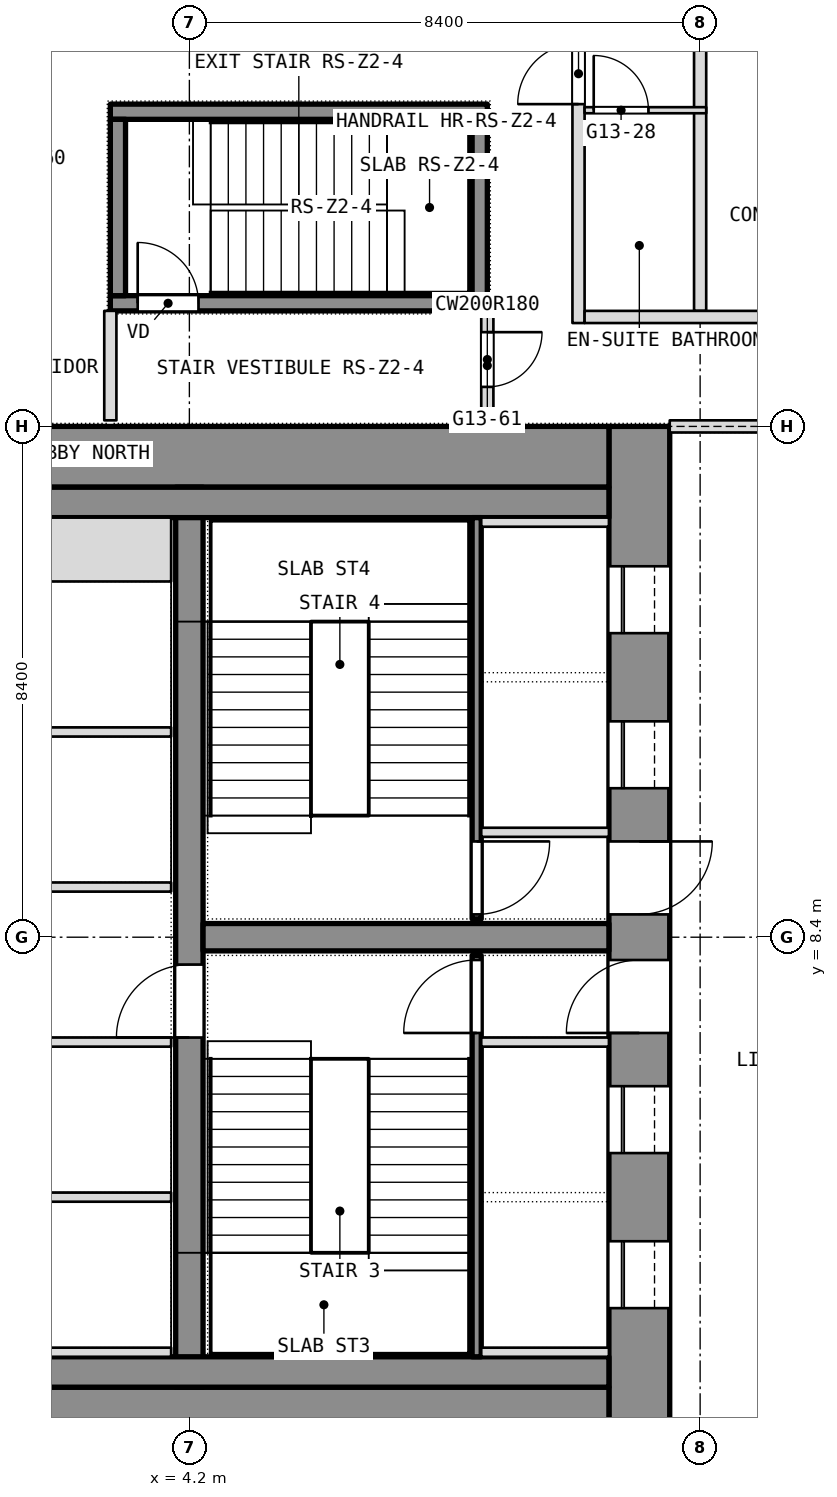
"""IFC4 building model, lengths in metres.
Left out: names, types, materials, properties, quantities, classifications, styles, units other than length and angle.
Written with IfcOpenShell. Run it as: python <this file> out.ifc"""

import sys

from ifc_helpers import new_model, si_unit, direction, frame, frame_2d, origin, place, context, subcontext, project, spatial, rectangle, extrude, element, fill, save


model = new_model("IFC4")
c1 = context("Model", 3, precision=1e-05, world=origin(), true_north=direction((0.0, 1.0)))
c2 = subcontext(c1, "Body", "Model", "MODEL_VIEW")
j1 = project(units=[si_unit("LENGTHUNIT", "METRE"), si_unit("PLANEANGLEUNIT", "RADIAN")], contexts=[c1])
p1 = place(None, origin())
s1 = spatial("IfcSite", under=j1, at=p1, CompositionType="ELEMENT")
p2 = place(p1, origin())
s2 = spatial("IfcBuilding", under=s1, at=p2, CompositionType="ELEMENT")
p3 = place(p2, frame((0.0, 0.0, 148.1)))
s3 = spatial("IfcBuildingStorey", under=s2, at=p3, CompositionType="ELEMENT", Elevation=148.1)
p4 = place(p3, frame((11.6, 0.0, 0.0), z_axis=(0.0, 0.0, 1.0), x_axis=(0.0, 1.0, 0.0)))
e1 = element("IfcWall", 1, at=p4, inside=s3, PredefinedType="SHEAR", context=c2, shape_type="SweptSolid", body=[
    extrude(rectangle(XDim=16.8, YDim=1.0, at=frame_2d((8.4, 0.0))), origin(), (0.0, 0.0, 1.0), 3.6),
])
p5 = place(p4, frame((2.3, 0.0, 0.0)))
e2 = element("IfcOpeningElement", 2, at=p5, cuts=e1, PredefinedType="OPENING", context=c2, shape_type="SweptSolid", body=[
    extrude(rectangle(XDim=1.1, YDim=2.1, at=frame_2d((0.55, 1.05))), frame((0.0, 0.5, 0.0), z_axis=(0.0, -1.0, 0.0), x_axis=(1.0, 0.0, 0.0)), (0.0, 0.0, 1.0), 1.0),
])
p6 = place(p4, frame((4.85, 0.0, 0.0)))
e3 = element("IfcOpeningElement", 3, at=p6, cuts=e1, PredefinedType="OPENING", context=c2, shape_type="SweptSolid", body=[
    extrude(rectangle(XDim=1.1, YDim=2.1, at=frame_2d((0.55, 1.05))), frame((0.0, 0.5, 0.0), z_axis=(0.0, -1.0, 0.0), x_axis=(1.0, 0.0, 0.0)), (0.0, 0.0, 1.0), 1.0),
])
p7 = place(p4, frame((6.825, 0.0, 0.0)))
e4 = element("IfcOpeningElement", 4, at=p7, cuts=e1, PredefinedType="OPENING", context=c2, shape_type="SweptSolid", body=[
    extrude(rectangle(XDim=1.2, YDim=2.1, at=frame_2d((0.6, 1.05))), frame((0.0, 0.5, 0.0), z_axis=(0.0, -1.0, 0.0), x_axis=(1.0, 0.0, 0.0)), (0.0, 0.0, 1.0), 1.0),
])
p8 = place(p4, frame((13.4, 0.0, 0.0)))
e5 = element("IfcOpeningElement", 5, at=p8, cuts=e1, PredefinedType="OPENING", context=c2, shape_type="SweptSolid", body=[
    extrude(rectangle(XDim=1.1, YDim=2.1, at=frame_2d((0.55, 1.05))), frame((0.0, 0.5, 0.0), z_axis=(0.0, -1.0, 0.0), x_axis=(1.0, 0.0, 0.0)), (0.0, 0.0, 1.0), 1.0),
])
p9 = place(p4, frame((10.85, 0.0, 0.0)))
e6 = element("IfcOpeningElement", 6, at=p9, cuts=e1, PredefinedType="OPENING", context=c2, shape_type="SweptSolid", body=[
    extrude(rectangle(XDim=1.1, YDim=2.1, at=frame_2d((0.55, 1.05))), frame((0.0, 0.5, 0.0), z_axis=(0.0, -1.0, 0.0), x_axis=(1.0, 0.0, 0.0)), (0.0, 0.0, 1.0), 1.0),
])
p10 = place(p4, frame((8.775, 0.0, 0.0)))
e7 = element("IfcOpeningElement", 7, at=p10, cuts=e1, PredefinedType="OPENING", context=c2, shape_type="SweptSolid", body=[
    extrude(rectangle(XDim=1.2, YDim=2.1, at=frame_2d((0.6, 1.05))), frame((0.0, 0.5, 0.0), z_axis=(0.0, -1.0, 0.0), x_axis=(1.0, 0.0, 0.0)), (0.0, 0.0, 1.0), 1.0),
])
for number, where, z_axis, x_axis in (
    (8, (-11.1, 0.5, 0.0), (0.0, 0.0, 1.0), (1.0, 0.0, 0.0)),
    (9, (-11.1, 16.3, 0.0), (0.0, 0.0, 1.0), (1.0, 0.0, 0.0)),
):
    element("IfcWall", number, at=place(p3, frame(where, z_axis=z_axis, x_axis=x_axis)), inside=s3, PredefinedType="SHEAR", context=c2, shape_type="SweptSolid", body=[
        extrude(rectangle(XDim=22.2, YDim=1.0, at=frame_2d((11.1, 0.0))), origin(), (0.0, 0.0, 1.0), 3.6),
    ])
p11 = place(p3, frame((4.2, 1.0, 0.0), z_axis=(0.0, 0.0, 1.0), x_axis=(0.0, 1.0, 0.0)))
e10 = element("IfcWall", 10, at=p11, inside=s3, PredefinedType="SHEAR", context=c2, shape_type="SweptSolid", body=[
    extrude(rectangle(XDim=14.8, YDim=0.45, at=frame_2d((7.4, 0.0))), origin(), (0.0, 0.0, 1.0), 3.6),
])
p12 = place(p11, frame((5.75, 0.0, 0.0)))
e11 = element("IfcOpeningElement", 11, at=p12, cuts=e10, PredefinedType="OPENING", context=c2, shape_type="SweptSolid", body=[
    extrude(rectangle(XDim=1.2, YDim=2.1, at=frame_2d((0.6, 1.05))), frame((0.0, 0.225, 0.0), z_axis=(0.0, -1.0, 0.0), x_axis=(1.0, 0.0, 0.0)), (0.0, 0.0, 1.0), 0.45),
])
p13 = place(p3, frame((4.425, 8.4, 0.0), z_axis=(0.0, 0.0, 1.0), x_axis=(1.0, 0.0, 0.0)))
e12 = element("IfcWall", 12, at=p13, inside=s3, PredefinedType="SHEAR", context=c2, shape_type="SweptSolid", body=[
    extrude(rectangle(XDim=6.675, YDim=0.45, at=frame_2d((3.337, 0.0))), origin(), (0.0, 0.0, 1.0), 3.6),
])
p14 = place(p3, frame((12.6, 18.7, 0.0), z_axis=(0.0, 0.0, 1.0), x_axis=(0.0, 1.0, 0.0)))
e13 = element("IfcWall", 13, at=p14, inside=s3, PredefinedType="PARTITIONING", context=c2, shape_type="SweptSolid", body=[
    extrude(rectangle(XDim=9.24, YDim=0.2, at=frame_2d((4.62, 0.0))), origin(), (0.0, 0.0, 1.0), 3.34),
])
p15 = place(p3, frame((10.6, 18.5, 0.0), z_axis=(0.0, 0.0, 1.0), x_axis=(0.0, 1.0, 0.0)))
e14 = element("IfcWall", 14, at=p15, inside=s3, PredefinedType="PARTITIONING", context=c2, shape_type="SweptSolid", body=[
    extrude(rectangle(XDim=5.0, YDim=0.2, at=frame_2d((2.5, 0.0))), origin(), (0.0, 0.0, 1.0), 3.34),
])
p16 = place(p15, frame((3.6, 0.0, 0.0)))
e15 = element("IfcOpeningElement", 15, at=p16, cuts=e14, PredefinedType="OPENING", context=c2, shape_type="SweptSolid", body=[
    extrude(rectangle(XDim=1.0, YDim=2.1, at=frame_2d((0.5, 1.05))), frame((0.0, 0.1, 0.0), z_axis=(0.0, -1.0, 0.0), x_axis=(1.0, 0.0, 0.0)), (0.0, 0.0, 1.0), 0.2),
])
p17 = place(p3, frame((9.1, 16.9, 0.0), z_axis=(0.0, 0.0, 1.0), x_axis=(0.0, 1.0, 0.0)))
e16 = element("IfcWall", 16, at=p17, inside=s3, PredefinedType="PARTITIONING", context=c2, shape_type="SweptSolid", body=[
    extrude(rectangle(XDim=1.8, YDim=0.2, at=frame_2d((0.9, 0.0))), origin(), (0.0, 0.0, 1.0), 3.34),
])
p18 = place(p17, frame((0.55, 0.0, 0.0)))
e17 = element("IfcOpeningElement", 17, at=p18, cuts=e16, PredefinedType="OPENING", context=c2, shape_type="SweptSolid", body=[
    extrude(rectangle(XDim=0.9, YDim=2.1, at=frame_2d((0.45, 1.05))), frame((0.0, 0.1, 0.0), z_axis=(0.0, -1.0, 0.0), x_axis=(1.0, 0.0, 0.0)), (0.0, 0.0, 1.0), 0.2),
])
p19 = place(p3, frame((2.9, 16.9, 0.0), z_axis=(0.0, 0.0, 1.0), x_axis=(0.0, 1.0, 0.0)))
e18 = element("IfcWall", 18, at=p19, inside=s3, PredefinedType="PARTITIONING", context=c2, shape_type="SweptSolid", body=[
    extrude(rectangle(XDim=1.8, YDim=0.2, at=frame_2d((0.9, 0.0))), origin(), (0.0, 0.0, 1.0), 3.34),
])
p20 = place(p3, frame((10.7, 18.6, 0.0), z_axis=(0.0, 0.0, 1.0), x_axis=(1.0, 0.0, 0.0)))
e19 = element("IfcWall", 19, at=p20, inside=s3, PredefinedType="PARTITIONING", context=c2, shape_type="SweptSolid", body=[
    extrude(rectangle(XDim=6.2, YDim=0.2, at=frame_2d((3.1, 0.0))), origin(), (0.0, 0.0, 1.0), 3.34),
])
p21 = place(p3, frame((10.7, 22.0, 0.0), z_axis=(0.0, 0.0, 1.0), x_axis=(1.0, 0.0, 0.0)))
e20 = element("IfcWall", 20, at=p21, inside=s3, PredefinedType="PARTITIONING", context=c2, shape_type="SweptSolid", body=[
    extrude(rectangle(XDim=2.0, YDim=0.1, at=frame_2d((1.0, 0.0))), origin(), (0.0, 0.0, 1.0), 3.34),
])
p22 = place(p21, frame((0.15, 0.0, 0.0)))
e21 = element("IfcOpeningElement", 21, at=p22, cuts=e20, PredefinedType="OPENING", context=c2, shape_type="SweptSolid", body=[
    extrude(rectangle(XDim=0.9, YDim=2.1, at=frame_2d((0.45, 1.05))), frame((0.0, 0.05, 0.0), z_axis=(0.0, -1.0, 0.0), x_axis=(1.0, 0.0, 0.0)), (0.0, 0.0, 1.0), 0.1),
])
for number, where, z_axis, x_axis in (
    (22, (-11.1, 1.25, 0.0), (0.0, 0.0, 1.0), (1.0, 0.0, 0.0)),
    (23, (-11.1, 15.55, 0.0), (0.0, 0.0, 1.0), (1.0, 0.0, 0.0)),
):
    element("IfcWall", number, at=place(p3, frame(where, z_axis=z_axis, x_axis=x_axis)), inside=s3, PredefinedType="PARTITIONING", context=c2, shape_type="SweptSolid", body=[
        extrude(rectangle(XDim=22.2, YDim=0.5, at=frame_2d((11.1, 0.0))), origin(), (0.0, 0.0, 1.0), 3.34),
    ])
p23 = place(p3, frame((8.925, 1.5, 0.0), z_axis=(0.0, 0.0, 1.0), x_axis=(0.0, 1.0, 0.0)))
e24 = element("IfcWall", 24, at=p23, inside=s3, PredefinedType="SHEAR", context=c2, shape_type="SweptSolid", body=[
    extrude(rectangle(XDim=6.6, YDim=0.15, at=frame_2d((3.3, 0.0))), origin(), (0.0, 0.0, 1.0), 3.34),
])
p24 = place(p23, frame((5.325, 0.0, 0.0)))
e25 = element("IfcOpeningElement", 25, at=p24, cuts=e24, PredefinedType="OPENING", context=c2, shape_type="SweptSolid", body=[
    extrude(rectangle(XDim=1.2, YDim=2.1, at=frame_2d((0.6, 1.05))), frame((0.0, 0.075, 0.0), z_axis=(0.0, -1.0, 0.0), x_axis=(1.0, 0.0, 0.0)), (0.0, 0.0, 1.0), 0.15),
])
for number, where, z_axis, x_axis in (
    (26, (9.0, 6.675, 0.0), (0.0, 0.0, 1.0), (1.0, 0.0, 0.0)),
    (27, (9.0, 1.575, 0.0), (0.0, 0.0, 1.0), (1.0, 0.0, 0.0)),
):
    element("IfcWall", number, at=place(p3, frame(where, z_axis=z_axis, x_axis=x_axis)), inside=s3, PredefinedType="SHEAR", context=c2, shape_type="SweptSolid", body=[
        extrude(rectangle(XDim=2.1, YDim=0.15, at=frame_2d((1.05, 0.0))), origin(), (0.0, 0.0, 1.0), 3.6),
    ])
p25 = place(p3, frame((8.925, 8.7, 0.0), z_axis=(0.0, 0.0, 1.0), x_axis=(0.0, 1.0, 0.0)))
e28 = element("IfcWall", 28, at=p25, inside=s3, PredefinedType="SHEAR", context=c2, shape_type="SweptSolid", body=[
    extrude(rectangle(XDim=6.6, YDim=0.15, at=frame_2d((3.3, 0.0))), origin(), (0.0, 0.0, 1.0), 3.34),
])
p26 = place(p25, frame((0.075, 0.0, 0.0)))
e29 = element("IfcOpeningElement", 29, at=p26, cuts=e28, PredefinedType="OPENING", context=c2, shape_type="SweptSolid", body=[
    extrude(rectangle(XDim=1.2, YDim=2.1, at=frame_2d((0.6, 1.05))), frame((0.0, 0.075, 0.0), z_axis=(0.0, -1.0, 0.0), x_axis=(1.0, 0.0, 0.0)), (0.0, 0.0, 1.0), 0.15),
])
for number, where, z_axis, x_axis in (
    (30, (9.0, 10.125, 0.0), (0.0, 0.0, 1.0), (1.0, 0.0, 0.0)),
    (31, (9.0, 15.225, 0.0), (0.0, 0.0, 1.0), (1.0, 0.0, 0.0)),
):
    element("IfcWall", number, at=place(p3, frame(where, z_axis=z_axis, x_axis=x_axis)), inside=s3, PredefinedType="SHEAR", context=c2, shape_type="SweptSolid", body=[
        extrude(rectangle(XDim=2.1, YDim=0.15, at=frame_2d((1.05, 0.0))), origin(), (0.0, 0.0, 1.0), 3.6),
    ])
p27 = place(p3, frame((-3.9, 4.125, 0.0), z_axis=(0.0, 0.0, 1.0), x_axis=(1.0, 0.0, 0.0)))
e32 = element("IfcWall", 32, at=p27, inside=s3, PredefinedType="PARTITIONING", context=c2, shape_type="SweptSolid", body=[
    extrude(rectangle(XDim=7.8, YDim=0.15, at=frame_2d((3.9, 0.0))), origin(), (0.0, 0.0, 1.0), 3.34),
])
p28 = place(p27, frame((3.75, 0.0, 0.0)))
e33 = element("IfcOpeningElement", 33, at=p28, cuts=e32, PredefinedType="OPENING", context=c2, shape_type="SweptSolid", body=[
    extrude(rectangle(XDim=1.2, YDim=2.1, at=frame_2d((0.6, 1.05))), frame((0.0, 0.075, 0.0), z_axis=(0.0, -1.0, 0.0), x_axis=(1.0, 0.0, 0.0)), (0.0, 0.0, 1.0), 0.15),
])
p29 = place(p3, frame((-3.9, 11.775, 0.0), z_axis=(0.0, 0.0, 1.0), x_axis=(1.0, 0.0, 0.0)))
e34 = element("IfcWall", 34, at=p29, inside=s3, PredefinedType="PARTITIONING", context=c2, shape_type="SweptSolid", body=[
    extrude(rectangle(XDim=7.8, YDim=0.15, at=frame_2d((3.9, 0.0))), origin(), (0.0, 0.0, 1.0), 3.34),
])
p30 = place(p29, frame((3.3, 0.0, 0.0)))
e35 = element("IfcOpeningElement", 35, at=p30, cuts=e34, PredefinedType="OPENING", context=c2, shape_type="SweptSolid", body=[
    extrude(rectangle(XDim=1.2, YDim=2.1, at=frame_2d((0.6, 1.05))), frame((0.0, 0.075, 0.0), z_axis=(0.0, -1.0, 0.0), x_axis=(1.0, 0.0, 0.0)), (0.0, 0.0, 1.0), 0.15),
])
p31 = place(p3, frame((1.65, 1.575, 0.0), z_axis=(0.0, 0.0, 1.0), x_axis=(1.0, 0.0, 0.0)))
e36 = element("IfcWall", 36, at=p31, inside=s3, PredefinedType="SHEAR", context=c2, shape_type="SweptSolid", body=[
    extrude(rectangle(XDim=2.25, YDim=0.15, at=frame_2d((1.125, 0.0))), origin(), (0.0, 0.0, 1.0), 3.6),
])
p32 = place(p3, frame((1.65, 14.775, 0.0), z_axis=(0.0, 0.0, 1.0), x_axis=(1.0, 0.0, 0.0)))
e37 = element("IfcWall", 37, at=p32, inside=s3, PredefinedType="SHEAR", context=c2, shape_type="SweptSolid", body=[
    extrude(rectangle(XDim=2.25, YDim=1.05, at=frame_2d((1.125, 0.0))), origin(), (0.0, 0.0, 1.0), 3.6),
])
for number, where, z_axis, x_axis in (
    (38, (1.65, 6.675, 0.0), (0.0, 0.0, 1.0), (1.0, 0.0, 0.0)),
    (39, (1.65, 9.225, 0.0), (0.0, 0.0, 1.0), (1.0, 0.0, 0.0)),
):
    element("IfcWall", number, at=place(p3, frame(where, z_axis=z_axis, x_axis=x_axis)), inside=s3, PredefinedType="SHEAR", context=c2, shape_type="SweptSolid", body=[
        extrude(rectangle(XDim=2.25, YDim=0.15, at=frame_2d((1.125, 0.0))), origin(), (0.0, 0.0, 1.0), 3.6),
    ])
p33 = place(p3, frame((12.1, 16.8, 0.0), z_axis=(0.0, 0.0, 1.0), x_axis=(1.0, 0.0, 0.0)))
e40 = element("IfcWall", 40, at=p33, inside=s3, PredefinedType="PARTITIONING", context=c2, shape_type="SweptSolid", body=[
    extrude(rectangle(XDim=4.6, YDim=0.2, at=frame_2d((2.3, 0.0))), origin(), (0.0, 0.0, 1.0), 2.89),
])
p34 = place(p3, frame((2.9, 18.825, 0.1), z_axis=(0.0, 0.0, 1.0), x_axis=(1.0, 0.0, 0.0)))
e41 = element("IfcWall", 41, at=p34, inside=s3, PredefinedType="SHEAR", context=c2, shape_type="SweptSolid", body=[
    extrude(rectangle(XDim=6.2, YDim=0.25, at=frame_2d((3.1, 0.0))), origin(), (0.0, 0.0, 1.0), 3.6),
])
p35 = place(p34, frame((0.45, 0.0, 0.0)))
e42 = element("IfcOpeningElement", 42, at=p35, cuts=e41, PredefinedType="OPENING", context=c2, shape_type="SweptSolid", body=[
    extrude(rectangle(XDim=1.0, YDim=2.1, at=frame_2d((0.5, 1.05))), frame((0.0, 0.125, 0.0), z_axis=(0.0, -1.0, 0.0), x_axis=(1.0, 0.0, 0.0)), (0.0, 0.0, 1.0), 0.25),
])
p36 = place(p3, frame((2.9, 21.975, 0.1), z_axis=(0.0, 0.0, 1.0), x_axis=(1.0, 0.0, 0.0)))
e43 = element("IfcWall", 43, at=p36, inside=s3, PredefinedType="SHEAR", context=c2, shape_type="SweptSolid", body=[
    extrude(rectangle(XDim=6.2, YDim=0.25, at=frame_2d((3.1, 0.0))), origin(), (0.0, 0.0, 1.0), 3.6),
])
for number, where, z_axis, x_axis in (
    (44, (3.025, 18.95, 0.1), (0.0, 0.0, 1.0), (0.0, 1.0, 0.0)),
    (45, (8.975, 18.95, 0.1), (0.0, 0.0, 1.0), (0.0, 1.0, 0.0)),
):
    element("IfcWall", number, at=place(p3, frame(where, z_axis=z_axis, x_axis=x_axis)), inside=s3, PredefinedType="SHEAR", context=c2, shape_type="SweptSolid", body=[
        extrude(rectangle(XDim=2.9, YDim=0.25, at=frame_2d((1.45, 0.0))), origin(), (0.0, 0.0, 1.0), 3.6),
    ])
p37 = place(p16, origin())
e46 = element("IfcDoor", 46, at=p37, inside=s3, OperationType="SINGLE_SWING_LEFT", PredefinedType="DOOR", context=c2, shape_type="SweptSolid", body=[
    extrude(rectangle(XDim=1.0, YDim=2.1, at=frame_2d((0.5, 1.05))), frame((0.0, 0.025, 0.0), z_axis=(0.0, -1.0, 0.0), x_axis=(1.0, 0.0, 0.0)), (0.0, 0.0, 1.0), 0.05),
])
fill(e15, e46)
p38 = place(p18, origin())
e47 = element("IfcDoor", 47, at=p38, inside=s3, OperationType="SINGLE_SWING_RIGHT", PredefinedType="DOOR", context=c2, shape_type="SweptSolid", body=[
    extrude(rectangle(XDim=0.9, YDim=2.1, at=frame_2d((0.45, 1.05))), frame((0.0, 0.025, 0.0), z_axis=(0.0, -1.0, 0.0), x_axis=(1.0, 0.0, 0.0)), (0.0, 0.0, 1.0), 0.05),
])
fill(e17, e47)
p39 = place(p22, origin())
e48 = element("IfcDoor", 48, at=p39, inside=s3, OperationType="SINGLE_SWING_RIGHT", PredefinedType="DOOR", context=c2, shape_type="SweptSolid", body=[
    extrude(rectangle(XDim=0.9, YDim=2.1, at=frame_2d((0.45, 1.05))), frame((0.0, 0.025, 0.0), z_axis=(0.0, -1.0, 0.0), x_axis=(1.0, 0.0, 0.0)), (0.0, 0.0, 1.0), 0.05),
])
fill(e21, e48)
p40 = place(p35, origin())
e49 = element("IfcDoor", 49, at=p40, inside=s3, OperationType="SINGLE_SWING_LEFT", PredefinedType="DOOR", context=c2, shape_type="SweptSolid", body=[
    extrude(rectangle(XDim=1.0, YDim=2.1, at=frame_2d((0.5, 1.05))), frame((0.0, 0.025, 0.0), z_axis=(0.0, -1.0, 0.0), x_axis=(1.0, 0.0, 0.0)), (0.0, 0.0, 1.0), 0.05),
])
fill(e42, e49)
p41 = place(p5, origin())
e50 = element("IfcDoor", 50, at=p41, inside=s3, OperationType="SLIDING_TO_LEFT", PredefinedType="DOOR", context=c2, shape_type="SweptSolid", body=[
    extrude(rectangle(XDim=1.1, YDim=2.1, at=frame_2d((0.55, 1.05))), frame((0.0, 0.025, 0.0), z_axis=(0.0, -1.0, 0.0), x_axis=(1.0, 0.0, 0.0)), (0.0, 0.0, 1.0), 0.05),
])
fill(e2, e50)
p42 = place(p6, origin())
e51 = element("IfcDoor", 51, at=p42, inside=s3, OperationType="SLIDING_TO_LEFT", PredefinedType="DOOR", context=c2, shape_type="SweptSolid", body=[
    extrude(rectangle(XDim=1.1, YDim=2.1, at=frame_2d((0.55, 1.05))), frame((0.0, 0.025, 0.0), z_axis=(0.0, -1.0, 0.0), x_axis=(1.0, 0.0, 0.0)), (0.0, 0.0, 1.0), 0.05),
])
fill(e3, e51)
p43 = place(p7, origin())
e52 = element("IfcDoor", 52, at=p43, inside=s3, OperationType="SINGLE_SWING_LEFT", PredefinedType="DOOR", context=c2, shape_type="SweptSolid", body=[
    extrude(rectangle(XDim=1.2, YDim=2.1, at=frame_2d((0.6, 1.05))), frame((0.0, 0.025, 0.0), z_axis=(0.0, -1.0, 0.0), x_axis=(1.0, 0.0, 0.0)), (0.0, 0.0, 1.0), 0.05),
])
fill(e4, e52)
p44 = place(p24, origin())
e53 = element("IfcDoor", 53, at=p44, inside=s3, OperationType="SINGLE_SWING_LEFT", PredefinedType="DOOR", context=c2, shape_type="SweptSolid", body=[
    extrude(rectangle(XDim=1.2, YDim=2.1, at=frame_2d((0.6, 1.05))), frame((0.0, 0.025, 0.0), z_axis=(0.0, -1.0, 0.0), x_axis=(1.0, 0.0, 0.0)), (0.0, 0.0, 1.0), 0.05),
])
fill(e25, e53)
p45 = place(p8, origin())
e54 = element("IfcDoor", 54, at=p45, inside=s3, OperationType="SLIDING_TO_LEFT", PredefinedType="DOOR", context=c2, shape_type="SweptSolid", body=[
    extrude(rectangle(XDim=1.1, YDim=2.1, at=frame_2d((0.55, 1.05))), frame((0.0, 0.025, 0.0), z_axis=(0.0, -1.0, 0.0), x_axis=(1.0, 0.0, 0.0)), (0.0, 0.0, 1.0), 0.05),
])
fill(e5, e54)
p46 = place(p9, origin())
e55 = element("IfcDoor", 55, at=p46, inside=s3, OperationType="SLIDING_TO_LEFT", PredefinedType="DOOR", context=c2, shape_type="SweptSolid", body=[
    extrude(rectangle(XDim=1.1, YDim=2.1, at=frame_2d((0.55, 1.05))), frame((0.0, 0.025, 0.0), z_axis=(0.0, -1.0, 0.0), x_axis=(1.0, 0.0, 0.0)), (0.0, 0.0, 1.0), 0.05),
])
fill(e6, e55)
p47 = place(p10, origin())
e56 = element("IfcDoor", 56, at=p47, inside=s3, OperationType="SINGLE_SWING_LEFT", PredefinedType="DOOR", context=c2, shape_type="SweptSolid", body=[
    extrude(rectangle(XDim=1.2, YDim=2.1, at=frame_2d((0.6, 1.05))), frame((0.0, 0.025, 0.0), z_axis=(0.0, -1.0, 0.0), x_axis=(1.0, 0.0, 0.0)), (0.0, 0.0, 1.0), 0.05),
])
fill(e7, e56)
p48 = place(p26, origin())
e57 = element("IfcDoor", 57, at=p48, inside=s3, OperationType="SINGLE_SWING_LEFT", PredefinedType="DOOR", context=c2, shape_type="SweptSolid", body=[
    extrude(rectangle(XDim=1.2, YDim=2.1, at=frame_2d((0.6, 1.05))), frame((0.0, 0.025, 0.0), z_axis=(0.0, -1.0, 0.0), x_axis=(1.0, 0.0, 0.0)), (0.0, 0.0, 1.0), 0.05),
])
fill(e29, e57)
p49 = place(p12, origin())
e58 = element("IfcDoor", 58, at=p49, inside=s3, OperationType="SINGLE_SWING_LEFT", PredefinedType="DOOR", context=c2, shape_type="SweptSolid", body=[
    extrude(rectangle(XDim=1.2, YDim=2.1, at=frame_2d((0.6, 1.05))), frame((0.0, 0.025, 0.0), z_axis=(0.0, -1.0, 0.0), x_axis=(1.0, 0.0, 0.0)), (0.0, 0.0, 1.0), 0.05),
])
fill(e11, e58)
save(model, sys.argv[1])
